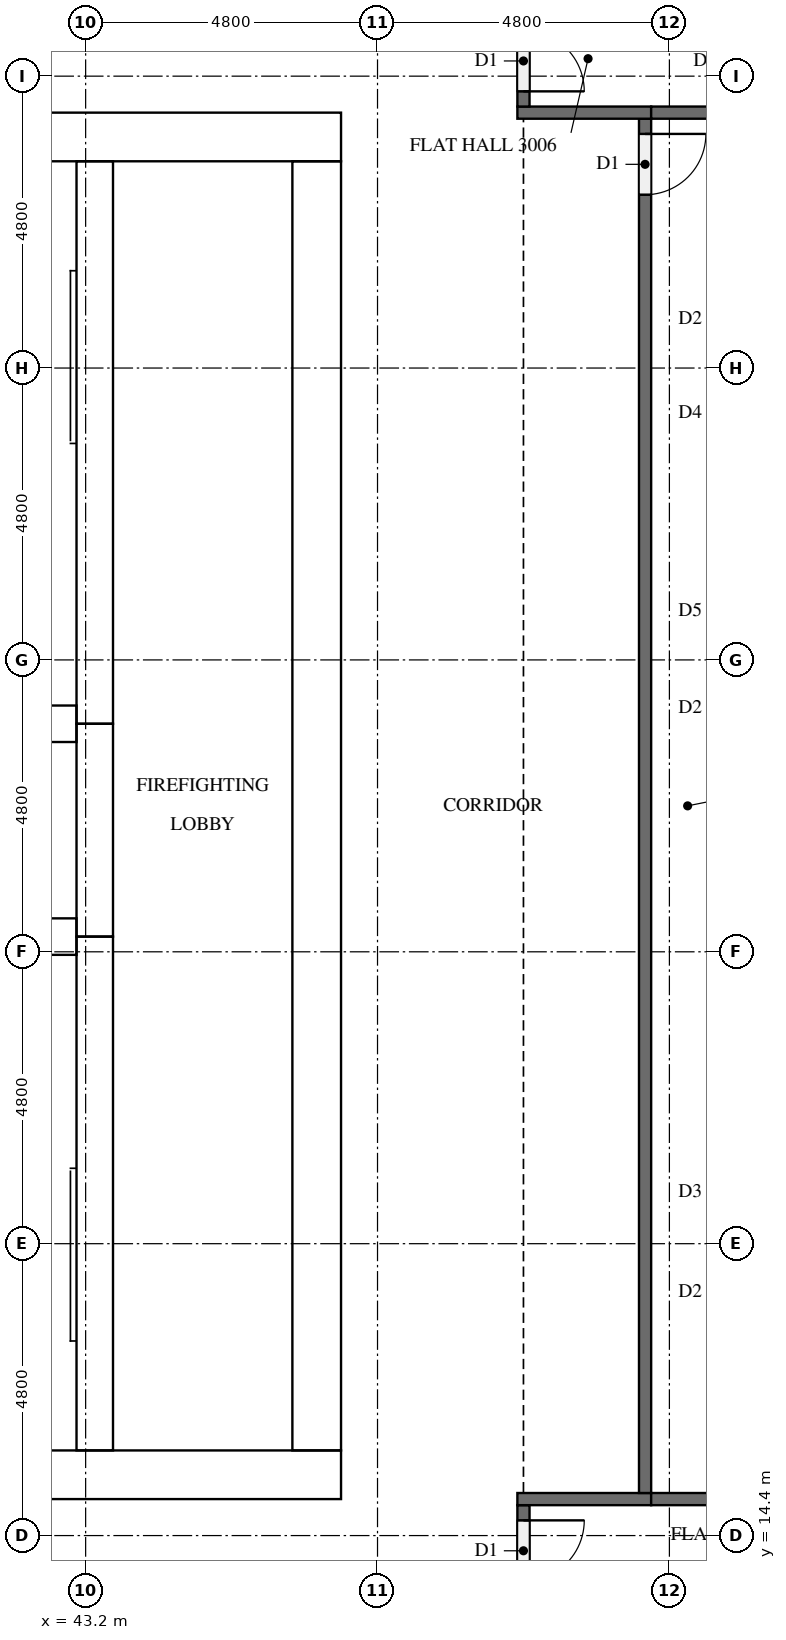
"""IFC4 building model, lengths in metres.
Left out: names, types, materials, properties, quantities, classifications, styles, units other than length and angle.
Written with IfcOpenShell. Run it as: python <this file> out.ifc"""

import sys

from ifc_helpers import new_model, si_unit, direction, frame, frame_2d, origin, place, context, subcontext, project, spatial, rectangle, extrude, element, fill, save


model = new_model("IFC4")
c1 = context("Model", 3, precision=1e-05, world=origin(), true_north=direction((0.0, 1.0)))
c2 = subcontext(c1, "Body", "Model", "MODEL_VIEW")
j1 = project(units=[si_unit("LENGTHUNIT", "METRE"), si_unit("PLANEANGLEUNIT", "RADIAN")], contexts=[c1])
p1 = place(None, origin())
s1 = spatial("IfcSite", under=j1, at=p1, CompositionType="ELEMENT")
p2 = place(p1, origin())
s2 = spatial("IfcBuilding", under=s1, at=p2, CompositionType="ELEMENT")
p3 = place(p2, frame((0.0, 0.0, 119.1)))
s3 = spatial("IfcBuildingStorey", under=s2, at=p3, CompositionType="ELEMENT", Elevation=119.1)
p4 = place(p3, frame((15.0, 15.4, 0.0), z_axis=(0.0, 0.0, 1.0), x_axis=(1.0, 0.0, 0.0)))
e1 = element("IfcWall", 1, at=p4, inside=s3, PredefinedType="SHEAR", context=c2, shape_type="SweptSolid", body=[
    extrude(rectangle(XDim=32.4, YDim=0.8, at=frame_2d((16.2, 0.0))), origin(), (0.0, 0.0, 1.0), 3.2),
])
p5 = place(p4, frame((15.3, 0.0, 0.0)))
e2 = element("IfcOpeningElement", 2, at=p5, cuts=e1, PredefinedType="OPENING", context=c2, shape_type="SweptSolid", body=[
    extrude(rectangle(XDim=1.8, YDim=2.1, at=frame_2d((0.9, 1.05))), frame((0.0, 0.41, 0.0), z_axis=(0.0, -1.0, 0.0), x_axis=(1.0, 0.0, 0.0)), (0.0, 0.0, 1.0), 0.82),
])
p6 = place(p3, frame((15.0, 37.4, 0.0), z_axis=(0.0, 0.0, 1.0), x_axis=(1.0, 0.0, 0.0)))
e3 = element("IfcWall", 3, at=p6, inside=s3, PredefinedType="SHEAR", context=c2, shape_type="SweptSolid", body=[
    extrude(rectangle(XDim=32.4, YDim=0.8, at=frame_2d((16.2, 0.0))), origin(), (0.0, 0.0, 1.0), 3.2),
])
p7 = place(p6, frame((15.3, 0.0, 0.0)))
e4 = element("IfcOpeningElement", 4, at=p7, cuts=e3, PredefinedType="OPENING", context=c2, shape_type="SweptSolid", body=[
    extrude(rectangle(XDim=1.8, YDim=2.1, at=frame_2d((0.9, 1.05))), frame((0.0, 0.41, 0.0), z_axis=(0.0, -1.0, 0.0), x_axis=(1.0, 0.0, 0.0)), (0.0, 0.0, 1.0), 0.82),
])
p8 = place(p6, frame((1.51, 0.0, 0.0)))
e5 = element("IfcOpeningElement", 5, at=p8, cuts=e3, PredefinedType="OPENING", context=c2, shape_type="SweptSolid", body=[
    extrude(rectangle(XDim=1.0, YDim=2.1, at=frame_2d((0.5, 1.05))), frame((0.0, 0.41, 0.0), z_axis=(0.0, -1.0, 0.0), x_axis=(1.0, 0.0, 0.0)), (0.0, 0.0, 1.0), 0.82),
])
p9 = place(p6, frame((5.11, 0.0, 0.0)))
e6 = element("IfcOpeningElement", 6, at=p9, cuts=e3, PredefinedType="OPENING", context=c2, shape_type="SweptSolid", body=[
    extrude(rectangle(XDim=1.0, YDim=2.1, at=frame_2d((0.5, 1.05))), frame((0.0, 0.41, 0.0), z_axis=(0.0, -1.0, 0.0), x_axis=(1.0, 0.0, 0.0)), (0.0, 0.0, 1.0), 0.82),
])
p10 = place(p3, frame((47.0, 15.8, 0.0), z_axis=(0.0, 0.0, 1.0), x_axis=(0.0, 1.0, 0.0)))
e7 = element("IfcWall", 7, at=p10, inside=s3, PredefinedType="SHEAR", context=c2, shape_type="SweptSolid", body=[
    extrude(rectangle(XDim=21.2, YDim=0.8, at=frame_2d((10.6, 0.0))), origin(), (0.0, 0.0, 1.0), 3.2),
])
p11 = place(p10, frame((10.3, 0.0, 0.0)))
e8 = element("IfcOpeningElement", 8, at=p11, cuts=e7, PredefinedType="OPENING", context=c2, shape_type="SweptSolid", body=[
    extrude(rectangle(XDim=1.2, YDim=2.1, at=frame_2d((0.6, 1.05))), frame((0.0, 0.41, 0.0), z_axis=(0.0, -1.0, 0.0), x_axis=(1.0, 0.0, 0.0)), (0.0, 0.0, 1.0), 0.82),
])
p12 = place(p3, frame((43.35, 15.8, 0.0), z_axis=(0.0, 0.0, 1.0), x_axis=(0.0, 1.0, 0.0)))
e9 = element("IfcWall", 9, at=p12, inside=s3, PredefinedType="SHEAR", context=c2, shape_type="SweptSolid", body=[
    extrude(rectangle(XDim=8.45, YDim=0.6, at=frame_2d((4.225, 0.0))), origin(), (0.0, 0.0, 1.0), 3.2),
])
p13 = place(p12, frame((0.4, 0.0, 0.0)))
e10 = element("IfcOpeningElement", 10, at=p13, cuts=e9, PredefinedType="OPENING", context=c2, shape_type="SweptSolid", body=[
    extrude(rectangle(XDim=1.2, YDim=2.1, at=frame_2d((0.6, 1.05))), frame((0.0, 0.31, 0.0), z_axis=(0.0, -1.0, 0.0), x_axis=(1.0, 0.0, 0.0)), (0.0, 0.0, 1.0), 0.62),
])
p14 = place(p3, frame((43.35, 24.25, 0.0), z_axis=(0.0, 0.0, 1.0), x_axis=(0.0, 1.0, 0.0)))
e11 = element("IfcWall", 11, at=p14, inside=s3, PredefinedType="SHEAR", context=c2, shape_type="SweptSolid", body=[
    extrude(rectangle(XDim=3.5, YDim=0.6, at=frame_2d((1.75, 0.0))), origin(), (0.0, 0.0, 1.0), 3.2),
])
p15 = place(p14, frame((1.2, 0.0, 0.0)))
e12 = element("IfcOpeningElement", 12, at=p15, cuts=e11, PredefinedType="OPENING", context=c2, shape_type="SweptSolid", body=[
    extrude(rectangle(XDim=1.1, YDim=2.1, at=frame_2d((0.55, 1.05))), frame((0.0, 0.31, 0.0), z_axis=(0.0, -1.0, 0.0), x_axis=(1.0, 0.0, 0.0)), (0.0, 0.0, 1.0), 0.62),
])
p16 = place(p3, frame((43.35, 27.75, 0.0), z_axis=(0.0, 0.0, 1.0), x_axis=(0.0, 1.0, 0.0)))
e13 = element("IfcWall", 13, at=p16, inside=s3, PredefinedType="SHEAR", context=c2, shape_type="SweptSolid", body=[
    extrude(rectangle(XDim=9.25, YDim=0.6, at=frame_2d((4.625, 0.0))), origin(), (0.0, 0.0, 1.0), 3.2),
])
p17 = place(p16, frame((7.65, 0.0, 0.0)))
e14 = element("IfcOpeningElement", 14, at=p17, cuts=e13, PredefinedType="OPENING", context=c2, shape_type="SweptSolid", body=[
    extrude(rectangle(XDim=1.2, YDim=2.1, at=frame_2d((0.6, 1.05))), frame((0.0, 0.31, 0.0), z_axis=(0.0, -1.0, 0.0), x_axis=(1.0, 0.0, 0.0)), (0.0, 0.0, 1.0), 0.62),
])
for number, where, z_axis, x_axis in (
    (15, (39.6, 24.25, 0.0), (0.0, 0.0, 1.0), (1.0, 0.0, 0.0)),
    (16, (39.6, 27.75, 0.0), (0.0, 0.0, 1.0), (1.0, 0.0, 0.0)),
):
    element("IfcWall", number, at=place(p3, frame(where, z_axis=z_axis, x_axis=x_axis)), inside=s3, PredefinedType="SHEAR", context=c2, shape_type="SweptSolid", body=[
        extrude(rectangle(XDim=3.45, YDim=0.6, at=frame_2d((1.725, 0.0))), origin(), (0.0, 0.0, 1.0), 3.2),
    ])
p18 = place(p3, frame((50.4, 14.9, 0.0), z_axis=(0.0, 0.0, 1.0), x_axis=(0.0, -1.0, 0.0)))
e17 = element("IfcWall", 17, at=p18, inside=s3, PredefinedType="PARTITIONING", context=c2, shape_type="SweptSolid", body=[
    extrude(rectangle(XDim=2.8, YDim=0.2, at=frame_2d((1.4, 0.0))), origin(), (0.0, 0.0, 1.0), 3.2),
])
p19 = place(p18, frame((0.25, 0.0, 0.0)))
e18 = element("IfcOpeningElement", 18, at=p19, cuts=e17, PredefinedType="OPENING", context=c2, shape_type="SweptSolid", body=[
    extrude(rectangle(XDim=1.0, YDim=2.1, at=frame_2d((0.5, 1.05))), frame((0.0, 0.11, 0.0), z_axis=(0.0, -1.0, 0.0), x_axis=(1.0, 0.0, 0.0)), (0.0, 0.0, 1.0), 0.22),
])
p20 = place(p3, frame((50.3, 15.0, 0.0), z_axis=(0.0, 0.0, 1.0), x_axis=(1.0, 0.0, 0.0)))
e19 = element("IfcWall", 19, at=p20, inside=s3, PredefinedType="PARTITIONING", context=c2, shape_type="SweptSolid", body=[
    extrude(rectangle(XDim=2.2, YDim=0.2, at=frame_2d((1.1, 0.0))), origin(), (0.0, 0.0, 1.0), 3.2),
])
p21 = place(p3, frame((52.4, 37.7, 0.0), z_axis=(0.0, 0.0, 1.0), x_axis=(0.0, -1.0, 0.0)))
e20 = element("IfcWall", 20, at=p21, inside=s3, PredefinedType="PARTITIONING", context=c2, shape_type="SweptSolid", body=[
    extrude(rectangle(XDim=22.6, YDim=0.2, at=frame_2d((11.3, 0.0))), origin(), (0.0, 0.0, 1.0), 3.2),
])
p22 = place(p21, frame((0.25, 0.0, 0.0)))
e21 = element("IfcOpeningElement", 21, at=p22, cuts=e20, PredefinedType="OPENING", context=c2, shape_type="SweptSolid", body=[
    extrude(rectangle(XDim=1.0, YDim=2.1, at=frame_2d((0.5, 1.05))), frame((0.0, 0.11, 0.0), z_axis=(0.0, -1.0, 0.0), x_axis=(1.0, 0.0, 0.0)), (0.0, 0.0, 1.0), 0.22),
])
p23 = place(p3, frame((52.5, 37.8, 0.0), z_axis=(0.0, 0.0, 1.0), x_axis=(-1.0, 0.0, 0.0)))
e22 = element("IfcWall", 22, at=p23, inside=s3, PredefinedType="PARTITIONING", context=c2, shape_type="SweptSolid", body=[
    extrude(rectangle(XDim=2.2, YDim=0.2, at=frame_2d((1.1, 0.0))), origin(), (0.0, 0.0, 1.0), 3.2),
])
p24 = place(p3, frame((50.4, 40.7, 0.0), z_axis=(0.0, 0.0, 1.0), x_axis=(0.0, -1.0, 0.0)))
e23 = element("IfcWall", 23, at=p24, inside=s3, PredefinedType="PARTITIONING", context=c2, shape_type="SweptSolid", body=[
    extrude(rectangle(XDim=2.8, YDim=0.2, at=frame_2d((1.4, 0.0))), origin(), (0.0, 0.0, 1.0), 3.2),
])
p25 = place(p24, frame((1.55, 0.0, 0.0)))
e24 = element("IfcOpeningElement", 24, at=p25, cuts=e23, PredefinedType="OPENING", context=c2, shape_type="SweptSolid", body=[
    extrude(rectangle(XDim=1.0, YDim=2.1, at=frame_2d((0.5, 1.05))), frame((0.0, 0.11, 0.0), z_axis=(0.0, -1.0, 0.0), x_axis=(1.0, 0.0, 0.0)), (0.0, 0.0, 1.0), 0.22),
])
p26 = place(p3, frame((52.5, 15.0, 0.0), z_axis=(0.0, 0.0, 1.0), x_axis=(1.0, 0.0, 0.0)))
e25 = element("IfcWall", 25, at=p26, inside=s3, PredefinedType="PARTITIONING", context=c2, shape_type="SweptSolid", body=[
    extrude(rectangle(XDim=5.0, YDim=0.2, at=frame_2d((2.5, 0.0))), origin(), (0.0, 0.0, 1.0), 3.2),
])
p27 = place(p3, frame((52.5, 37.8, 0.0), z_axis=(0.0, 0.0, 1.0), x_axis=(1.0, 0.0, 0.0)))
e26 = element("IfcWall", 26, at=p27, inside=s3, PredefinedType="PARTITIONING", context=c2, shape_type="SweptSolid", body=[
    extrude(rectangle(XDim=4.725, YDim=0.2, at=frame_2d((2.363, 0.0))), origin(), (0.0, 0.0, 1.0), 3.2),
])
p28 = place(p15, origin())
e27 = element("IfcDoor", 27, at=p28, inside=s3, OperationType="DOUBLE_DOOR_SLIDING", PredefinedType="DOOR", context=c2, shape_type="SweptSolid", body=[
    extrude(rectangle(XDim=1.1, YDim=2.1, at=frame_2d((0.55, 1.05))), frame((0.0, 0.025, 0.0), z_axis=(0.0, -1.0, 0.0), x_axis=(1.0, 0.0, 0.0)), (0.0, 0.0, 1.0), 0.05),
])
fill(e12, e27)
p29 = place(p13, origin())
e28 = element("IfcDoor", 28, at=p29, inside=s3, OperationType="SINGLE_SWING_LEFT", PredefinedType="DOOR", context=c2, shape_type="SweptSolid", body=[
    extrude(rectangle(XDim=1.2, YDim=2.1, at=frame_2d((0.6, 1.05))), frame((0.0, 0.025, 0.0), z_axis=(0.0, -1.0, 0.0), x_axis=(1.0, 0.0, 0.0)), (0.0, 0.0, 1.0), 0.05),
])
fill(e10, e28)
p30 = place(p17, origin())
e29 = element("IfcDoor", 29, at=p30, inside=s3, OperationType="SINGLE_SWING_RIGHT", PredefinedType="DOOR", context=c2, shape_type="SweptSolid", body=[
    extrude(rectangle(XDim=1.2, YDim=2.1, at=frame_2d((0.6, 1.05))), frame((0.0, 0.025, 0.0), z_axis=(0.0, -1.0, 0.0), x_axis=(1.0, 0.0, 0.0)), (0.0, 0.0, 1.0), 0.05),
])
fill(e14, e29)
p31 = place(p11, origin())
e30 = element("IfcDoor", 30, at=p31, inside=s3, OperationType="SINGLE_SWING_RIGHT", PredefinedType="DOOR", context=c2, shape_type="SweptSolid", body=[
    extrude(rectangle(XDim=1.2, YDim=2.1, at=frame_2d((0.6, 1.05))), frame((0.0, 0.025, 0.0), z_axis=(0.0, -1.0, 0.0), x_axis=(1.0, 0.0, 0.0)), (0.0, 0.0, 1.0), 0.05),
])
fill(e8, e30)
p32 = place(p19, origin())
e31 = element("IfcDoor", 31, at=p32, inside=s3, OperationType="SINGLE_SWING_LEFT", PredefinedType="DOOR", context=c2, shape_type="SweptSolid", body=[
    extrude(rectangle(XDim=1.0, YDim=2.1, at=frame_2d((0.5, 1.05))), frame((0.0, 0.025, 0.0), z_axis=(0.0, -1.0, 0.0), x_axis=(1.0, 0.0, 0.0)), (0.0, 0.0, 1.0), 0.05),
])
fill(e18, e31)
p33 = place(p22, origin())
e32 = element("IfcDoor", 32, at=p33, inside=s3, OperationType="SINGLE_SWING_LEFT", PredefinedType="DOOR", context=c2, shape_type="SweptSolid", body=[
    extrude(rectangle(XDim=1.0, YDim=2.1, at=frame_2d((0.5, 1.05))), frame((0.0, 0.025, 0.0), z_axis=(0.0, -1.0, 0.0), x_axis=(1.0, 0.0, 0.0)), (0.0, 0.0, 1.0), 0.05),
])
fill(e21, e32)
p34 = place(p25, origin())
e33 = element("IfcDoor", 33, at=p34, inside=s3, OperationType="SINGLE_SWING_RIGHT", PredefinedType="DOOR", context=c2, shape_type="SweptSolid", body=[
    extrude(rectangle(XDim=1.0, YDim=2.1, at=frame_2d((0.5, 1.05))), frame((0.0, 0.025, 0.0), z_axis=(0.0, -1.0, 0.0), x_axis=(1.0, 0.0, 0.0)), (0.0, 0.0, 1.0), 0.05),
])
fill(e24, e33)
save(model, sys.argv[1])
